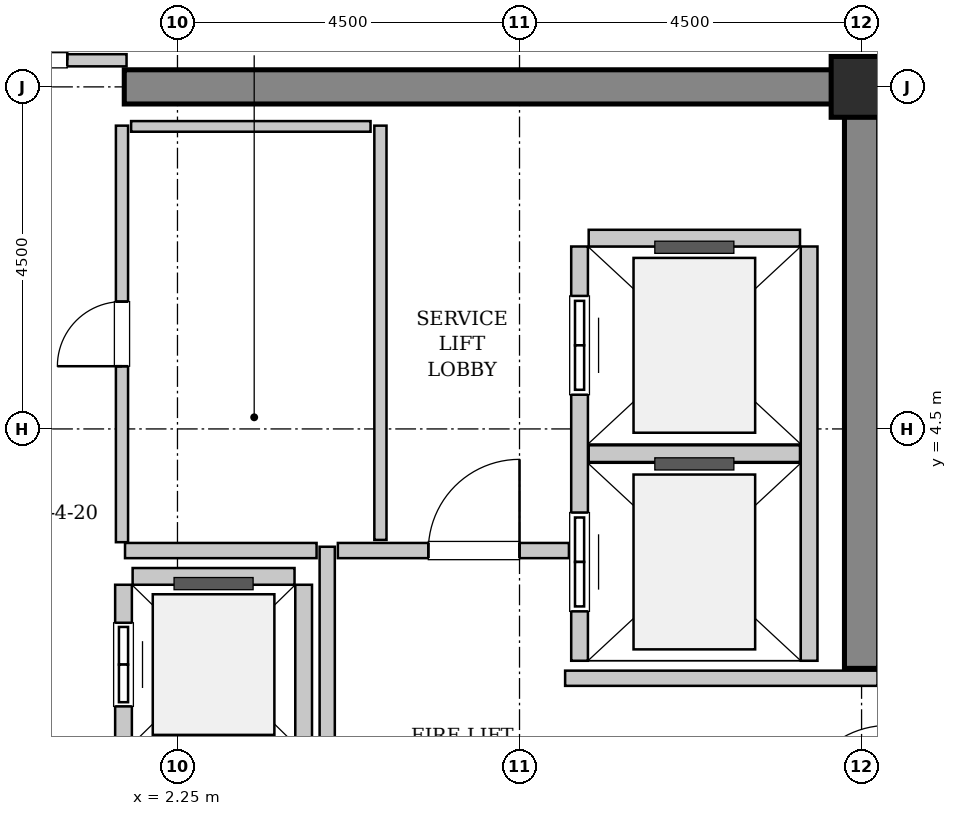
"""IFC4 building model, lengths in metres.
Left out: names, types, materials, properties, quantities, classifications, styles, units other than length and angle.
Written with IfcOpenShell. Run it as: python <this file> out.ifc"""

import sys

from ifc_helpers import new_model, si_unit, direction, frame, frame_2d, origin, origin_2d, place, context, subcontext, project, spatial, rectangle, hollow_rectangle, extrude, source, transform, mapped, element, fill, save


model = new_model("IFC4")
c1 = context("Model", 3, precision=1e-05, world=origin(), true_north=direction((0.0, 1.0)))
c2 = subcontext(c1, "Body", "Model", "MODEL_VIEW")
j1 = project(units=[si_unit("LENGTHUNIT", "METRE"), si_unit("PLANEANGLEUNIT", "RADIAN")], contexts=[c1])
p1 = place(None, origin())
s1 = spatial("IfcSite", under=j1, at=p1, CompositionType="ELEMENT")
p2 = place(p1, origin())
s2 = spatial("IfcBuilding", under=s1, at=p2, CompositionType="ELEMENT")
p3 = place(p2, frame((0.0, 0.0, 259.8)))
s3 = spatial("IfcBuildingStorey", under=s2, at=p3, CompositionType="ELEMENT", Elevation=259.8)
m1 = source(origin(), c2, "Body", "SweptSolid", [
    extrude(rectangle(XDim=9.925, YDim=0.45, at=frame_2d((4.962, 0.0))), origin(), (0.0, 0.0, 1.0), 4.8),
])
p4 = place(p3, frame((1.55, 9.0, 0.0), z_axis=(0.0, 0.0, 1.0), x_axis=(1.0, 0.0, 0.0)))
e1 = element("IfcWall", 1, at=p4, inside=s3, PredefinedType="SHEAR", context=c2, shape_type="MappedRepresentation", body=[
    mapped(m1, transform((0.0, 0.0, 0.0), x_axis=(1.0, 0.0, 0.0), y_axis=(0.0, 1.0, 0.0), z_axis=(0.0, 0.0, 1.0), scale=1.0)),
])
m2 = source(origin(), c2, "Body", "SweptSolid", [
    extrude(rectangle(XDim=7.425, YDim=0.45, at=frame_2d((3.712, 0.0))), origin(), (0.0, 0.0, 1.0), 4.8),
])
p5 = place(p3, frame((11.25, 1.35, 0.0), z_axis=(0.0, 0.0, 1.0), x_axis=(0.0, 1.0, 0.0)))
e2 = element("IfcWall", 2, at=p5, inside=s3, PredefinedType="SHEAR", context=c2, shape_type="MappedRepresentation", body=[
    mapped(m2, transform((0.0, 0.0, 0.0), x_axis=(1.0, 0.0, 0.0), y_axis=(0.0, 1.0, 0.0), z_axis=(0.0, 0.0, 1.0), scale=1.0)),
])
m3 = source(origin(), c2, "Body", "SweptSolid", [
    extrude(hollow_rectangle(XDim=0.8, YDim=0.8, WallThickness=0.04, InnerFilletRadius=0.04, OuterFilletRadius=0.08, at=origin_2d()), origin(), (0.0, 0.0, 1.0), 4.8),
])
p6 = place(p3, frame((11.25, 9.0, 0.0), z_axis=(0.0, 0.0, 1.0), x_axis=(1.0, 0.0, 0.0)))
e3 = element("IfcColumn", 3, at=p6, inside=s3, PredefinedType="COLUMN", context=c2, shape_type="MappedRepresentation", body=[
    mapped(m3, transform((0.0, 0.0, 0.0), x_axis=(1.0, 0.0, 0.0), y_axis=(0.0, 1.0, 0.0), z_axis=(0.0, 0.0, 1.0), scale=1.0)),
])
m4 = source(origin(), c2, "Body", "SweptSolid", [
    extrude(rectangle(XDim=5.45, YDim=0.22, at=frame_2d((2.725, 0.0))), origin(), (0.0, 0.0, 1.0), 4.535),
])
p7 = place(p3, frame((7.54, 6.9, 0.0), z_axis=(0.0, 0.0, 1.0), x_axis=(0.0, -1.0, 0.0)))
e4 = element("IfcWall", 4, at=p7, inside=s3, PredefinedType="SOLIDWALL", context=c2, shape_type="MappedRepresentation", body=[
    mapped(m4, transform((0.0, 0.0, 0.0), x_axis=(1.0, 0.0, 0.0), y_axis=(0.0, 1.0, 0.0), z_axis=(0.0, 0.0, 1.0), scale=1.0)),
])
p8 = place(p7, frame((3.5, 0.0, 0.0)))
e5 = element("IfcOpeningElement", 5, at=p8, cuts=e4, PredefinedType="OPENING", context=c2, shape_type="SweptSolid", body=[
    extrude(rectangle(XDim=1.3, YDim=2.3, at=frame_2d((0.65, 1.15))), frame((0.0, 0.12, 0.0), z_axis=(0.0, -1.0, 0.0), x_axis=(1.0, 0.0, 0.0)), (0.0, 0.0, 1.0), 0.24),
])
p9 = place(p7, frame((0.65, 0.0, 0.0)))
e6 = element("IfcOpeningElement", 6, at=p9, cuts=e4, PredefinedType="OPENING", context=c2, shape_type="SweptSolid", body=[
    extrude(rectangle(XDim=1.3, YDim=2.3, at=frame_2d((0.65, 1.15))), frame((0.0, 0.12, 0.0), z_axis=(0.0, -1.0, 0.0), x_axis=(1.0, 0.0, 0.0)), (0.0, 0.0, 1.0), 0.24),
])
p10 = place(p3, frame((10.56, 1.45, 0.0), z_axis=(0.0, 0.0, 1.0), x_axis=(0.0, 1.0, 0.0)))
e7 = element("IfcWall", 7, at=p10, inside=s3, PredefinedType="SOLIDWALL", context=c2, shape_type="MappedRepresentation", body=[
    mapped(m4, transform((0.0, 0.0, 0.0), x_axis=(1.0, 0.0, 0.0), y_axis=(0.0, 1.0, 0.0), z_axis=(0.0, 0.0, 1.0), scale=1.0)),
])
m5 = source(origin(), c2, "Body", "SweptSolid", [
    extrude(rectangle(XDim=2.78, YDim=0.22, at=frame_2d((1.39, 0.0))), origin(), (0.0, 0.0, 1.0), 4.535),
])
for number, where, z_axis, x_axis in (
    (8, (7.66, 4.175, 0.0), (0.0, 0.0, 1.0), (1.0, 0.0, 0.0)),
    (9, (10.44, 7.01, 0.0), (0.0, 0.0, 1.0), (-1.0, 0.0, 0.0)),
):
    element("IfcWall", number, at=place(p3, frame(where, z_axis=z_axis, x_axis=x_axis)), inside=s3, PredefinedType="SOLIDWALL", context=c2, shape_type="MappedRepresentation", body=[
        mapped(m5, transform((0.0, 0.0, 0.0), x_axis=(1.0, 0.0, 0.0), y_axis=(0.0, 1.0, 0.0), z_axis=(0.0, 0.0, 1.0), scale=1.0)),
    ])
m6 = source(origin(), c2, "Body", "SweptSolid", [
    extrude(rectangle(XDim=4.9, YDim=0.22, at=frame_2d((2.45, 0.0))), origin(), (0.0, 0.0, 1.0), 4.535),
])
p11 = place(p3, frame((1.54, 2.45, 0.0), z_axis=(0.0, 0.0, 1.0), x_axis=(0.0, -1.0, 0.0)))
e10 = element("IfcWall", 10, at=p11, inside=s3, PredefinedType="SOLIDWALL", context=c2, shape_type="MappedRepresentation", body=[
    mapped(m6, transform((0.0, 0.0, 0.0), x_axis=(1.0, 0.0, 0.0), y_axis=(0.0, 1.0, 0.0), z_axis=(0.0, 0.0, 1.0), scale=1.0)),
])
p12 = place(p11, frame((3.3, 0.0, 0.0)))
e11 = element("IfcOpeningElement", 11, at=p12, cuts=e10, PredefinedType="OPENING", context=c2, shape_type="SweptSolid", body=[
    extrude(rectangle(XDim=1.1, YDim=2.2, at=frame_2d((0.55, 1.1))), frame((0.0, 0.12, 0.0), z_axis=(0.0, -1.0, 0.0), x_axis=(1.0, 0.0, 0.0)), (0.0, 0.0, 1.0), 0.24),
])
p13 = place(p11, frame((0.5, 0.0, 0.0)))
e12 = element("IfcOpeningElement", 12, at=p13, cuts=e10, PredefinedType="OPENING", context=c2, shape_type="SweptSolid", body=[
    extrude(rectangle(XDim=1.1, YDim=2.2, at=frame_2d((0.55, 1.1))), frame((0.0, 0.12, 0.0), z_axis=(0.0, -1.0, 0.0), x_axis=(1.0, 0.0, 0.0)), (0.0, 0.0, 1.0), 0.24),
])
p14 = place(p3, frame((3.91, -2.45, 0.0), z_axis=(0.0, 0.0, 1.0), x_axis=(0.0, 1.0, 0.0)))
e13 = element("IfcWall", 13, at=p14, inside=s3, PredefinedType="SOLIDWALL", context=c2, shape_type="MappedRepresentation", body=[
    mapped(m6, transform((0.0, 0.0, 0.0), x_axis=(1.0, 0.0, 0.0), y_axis=(0.0, 1.0, 0.0), z_axis=(0.0, 0.0, 1.0), scale=1.0)),
])
m7 = source(origin(), c2, "Body", "SweptSolid", [
    extrude(rectangle(XDim=2.13, YDim=0.22, at=frame_2d((1.065, 0.0))), origin(), (0.0, 0.0, 1.0), 4.535),
])
p15 = place(p3, frame((3.79, 2.56, 0.0), z_axis=(0.0, 0.0, 1.0), x_axis=(-1.0, 0.0, 0.0)))
e14 = element("IfcWall", 14, at=p15, inside=s3, PredefinedType="SOLIDWALL", context=c2, shape_type="MappedRepresentation", body=[
    mapped(m7, transform((0.0, 0.0, 0.0), x_axis=(1.0, 0.0, 0.0), y_axis=(0.0, 1.0, 0.0), z_axis=(0.0, 0.0, 1.0), scale=1.0)),
])
m8 = source(origin(), c2, "Body", "SweptSolid", [
    extrude(rectangle(XDim=5.9, YDim=0.2, at=frame_2d((2.95, 0.0))), origin(), (0.0, 0.0, 1.0), 4.535),
])
p16 = place(p3, frame((4.22, -2.95, 0.0), z_axis=(0.0, 0.0, 1.0), x_axis=(0.0, 1.0, 0.0)))
e15 = element("IfcWall", 15, at=p16, inside=s3, PredefinedType="PARTITIONING", context=c2, shape_type="MappedRepresentation", body=[
    mapped(m8, transform((0.0, 0.0, 0.0), x_axis=(1.0, 0.0, 0.0), y_axis=(0.0, 1.0, 0.0), z_axis=(0.0, 0.0, 1.0), scale=1.0)),
])
m9 = source(origin(), c2, "Body", "SweptSolid", [
    extrude(rectangle(XDim=2.52, YDim=0.2, at=frame_2d((1.26, 0.0))), origin(), (0.0, 0.0, 1.0), 4.535),
])
p17 = place(p3, frame((1.56, 2.9, 0.0), z_axis=(0.0, 0.0, 1.0), x_axis=(1.0, 0.0, 0.0)))
e16 = element("IfcWall", 16, at=p17, inside=s3, PredefinedType="PARTITIONING", context=c2, shape_type="MappedRepresentation", body=[
    mapped(m9, transform((0.0, 0.0, 0.0), x_axis=(1.0, 0.0, 0.0), y_axis=(0.0, 1.0, 0.0), z_axis=(0.0, 0.0, 1.0), scale=1.0)),
])
m10 = source(origin(), c2, "Body", "SweptSolid", [
    extrude(rectangle(XDim=3.04, YDim=0.2, at=frame_2d((1.52, 0.0))), origin(), (0.0, 0.0, 1.0), 4.535),
])
p18 = place(p3, frame((4.36, 2.9, 0.0), z_axis=(0.0, 0.0, 1.0), x_axis=(1.0, 0.0, 0.0)))
e17 = element("IfcWall", 17, at=p18, inside=s3, PredefinedType="PARTITIONING", context=c2, shape_type="MappedRepresentation", body=[
    mapped(m10, transform((0.0, 0.0, 0.0), x_axis=(1.0, 0.0, 0.0), y_axis=(0.0, 1.0, 0.0), z_axis=(0.0, 0.0, 1.0), scale=1.0)),
])
p19 = place(p18, frame((1.19, 0.0, 0.0)))
e18 = element("IfcOpeningElement", 18, at=p19, cuts=e17, PredefinedType="OPENING", context=c2, shape_type="SweptSolid", body=[
    extrude(rectangle(XDim=1.2, YDim=2.15, at=frame_2d((0.6, 1.075))), frame((0.0, 0.11, 0.0), z_axis=(0.0, -1.0, 0.0), x_axis=(1.0, 0.0, 0.0)), (0.0, 0.0, 1.0), 0.22),
])
m11 = source(origin(), c2, "Body", "SweptSolid", [
    extrude(rectangle(XDim=4.11, YDim=0.2, at=frame_2d((2.055, 0.0))), origin(), (0.0, 0.0, 1.0), 4.535),
])
p20 = place(p3, frame((7.35, 1.22, 0.0), z_axis=(0.0, 0.0, 1.0), x_axis=(1.0, 0.0, 0.0)))
e19 = element("IfcWall", 19, at=p20, inside=s3, PredefinedType="PARTITIONING", context=c2, shape_type="MappedRepresentation", body=[
    mapped(m11, transform((0.0, 0.0, 0.0), x_axis=(1.0, 0.0, 0.0), y_axis=(0.0, 1.0, 0.0), z_axis=(0.0, 0.0, 1.0), scale=1.0)),
])
m12 = source(origin(), c2, "Body", "SweptSolid", [
    extrude(rectangle(XDim=3.16, YDim=0.16, at=frame_2d((1.58, 0.0))), origin(), (0.0, 0.0, 1.0), 3.625),
])
p21 = place(p3, frame((-1.58, 9.35, 0.0), z_axis=(0.0, 0.0, 1.0), x_axis=(1.0, 0.0, 0.0)))
e20 = element("IfcWall", 20, at=p21, inside=s3, PredefinedType="PARTITIONING", context=c2, shape_type="MappedRepresentation", body=[
    mapped(m12, transform((0.0, 0.0, 0.0), x_axis=(1.0, 0.0, 0.0), y_axis=(0.0, 1.0, 0.0), z_axis=(0.0, 0.0, 1.0), scale=1.0)),
])
p22 = place(p21, frame((0.78, 0.0, 0.0)))
e21 = element("IfcOpeningElement", 21, at=p22, cuts=e20, PredefinedType="OPENING", context=c2, shape_type="SweptSolid", body=[
    extrude(rectangle(XDim=1.6, YDim=2.3, at=frame_2d((0.8, 1.15))), frame((0.0, 0.09, 0.0), z_axis=(0.0, -1.0, 0.0), x_axis=(1.0, 0.0, 0.0)), (0.0, 0.0, 1.0), 0.18),
])
m13 = source(origin(), c2, "Body", "SweptSolid", [
    extrude(rectangle(XDim=5.45, YDim=0.16, at=frame_2d((2.725, 0.0))), origin(), (0.0, 0.0, 1.0), 4.535),
])
p23 = place(p3, frame((4.92, 3.04, 0.0), z_axis=(0.0, 0.0, 1.0), x_axis=(0.0, 1.0, 0.0)))
e22 = element("IfcWall", 22, at=p23, inside=s3, PredefinedType="PARTITIONING", context=c2, shape_type="MappedRepresentation", body=[
    mapped(m13, transform((0.0, 0.0, 0.0), x_axis=(1.0, 0.0, 0.0), y_axis=(0.0, 1.0, 0.0), z_axis=(0.0, 0.0, 1.0), scale=1.0)),
])
m14 = source(origin(), c2, "Body", "SweptSolid", [
    extrude(rectangle(XDim=5.48, YDim=0.16, at=frame_2d((2.74, 0.0))), origin(), (0.0, 0.0, 1.0), 4.535),
])
p24 = place(p3, frame((1.52, 3.01, 0.0), z_axis=(0.0, 0.0, 1.0), x_axis=(0.0, 1.0, 0.0)))
e23 = element("IfcWall", 23, at=p24, inside=s3, PredefinedType="PARTITIONING", context=c2, shape_type="MappedRepresentation", body=[
    mapped(m14, transform((0.0, 0.0, 0.0), x_axis=(1.0, 0.0, 0.0), y_axis=(0.0, 1.0, 0.0), z_axis=(0.0, 0.0, 1.0), scale=1.0)),
])
p25 = place(p24, frame((2.315, 0.0, 0.0)))
e24 = element("IfcOpeningElement", 24, at=p25, cuts=e23, PredefinedType="OPENING", context=c2, shape_type="SweptSolid", body=[
    extrude(rectangle(XDim=0.85, YDim=2.1, at=frame_2d((0.425, 1.05))), frame((0.0, 0.09, 0.0), z_axis=(0.0, -1.0, 0.0), x_axis=(1.0, 0.0, 0.0)), (0.0, 0.0, 1.0), 0.18),
])
m15 = source(origin(), c2, "Body", "SweptSolid", [
    extrude(rectangle(XDim=3.15, YDim=0.14, at=frame_2d((1.575, 0.0))), origin(), (0.0, 0.0, 1.0), 4.535),
])
p26 = place(p3, frame((1.64, 8.48, 0.0), z_axis=(0.0, 0.0, 1.0), x_axis=(1.0, 0.0, 0.0)))
e25 = element("IfcWall", 25, at=p26, inside=s3, PredefinedType="PARTITIONING", context=c2, shape_type="MappedRepresentation", body=[
    mapped(m15, transform((0.0, 0.0, 0.0), x_axis=(1.0, 0.0, 0.0), y_axis=(0.0, 1.0, 0.0), z_axis=(0.0, 0.0, 1.0), scale=1.0)),
])
m16 = source(origin(), c2, "Body", "SweptSolid", [
    extrude(rectangle(XDim=1.3, YDim=2.3, at=frame_2d((0.65, 1.15))), frame((0.0, 0.025, 0.0), z_axis=(0.0, -1.0, 0.0), x_axis=(1.0, 0.0, 0.0)), (0.0, 0.0, 1.0), 0.05),
])
p27 = place(p8, origin())
e26 = element("IfcDoor", 26, at=p27, inside=s3, OperationType="SLIDING_TO_RIGHT", PredefinedType="DOOR", context=c2, shape_type="MappedRepresentation", body=[
    mapped(m16, transform((0.0, 0.0, 0.0), x_axis=(1.0, 0.0, 0.0), y_axis=(0.0, 1.0, 0.0), z_axis=(0.0, 0.0, 1.0), scale=1.0)),
])
fill(e5, e26)
p28 = place(p9, origin())
e27 = element("IfcDoor", 27, at=p28, inside=s3, OperationType="SLIDING_TO_RIGHT", PredefinedType="DOOR", context=c2, shape_type="MappedRepresentation", body=[
    mapped(m16, transform((0.0, 0.0, 0.0), x_axis=(1.0, 0.0, 0.0), y_axis=(0.0, 1.0, 0.0), z_axis=(0.0, 0.0, 1.0), scale=1.0)),
])
fill(e6, e27)
m17 = source(origin(), c2, "Body", "SweptSolid", [
    extrude(rectangle(XDim=1.1, YDim=2.2, at=frame_2d((0.55, 1.1))), frame((0.0, 0.025, 0.0), z_axis=(0.0, -1.0, 0.0), x_axis=(1.0, 0.0, 0.0)), (0.0, 0.0, 1.0), 0.05),
])
p29 = place(p13, origin())
e28 = element("IfcDoor", 28, at=p29, inside=s3, OperationType="DOUBLE_DOOR_SLIDING", PredefinedType="DOOR", context=c2, shape_type="MappedRepresentation", body=[
    mapped(m17, transform((0.0, 0.0, 0.0), x_axis=(1.0, 0.0, 0.0), y_axis=(0.0, 1.0, 0.0), z_axis=(0.0, 0.0, 1.0), scale=1.0)),
])
fill(e12, e28)
m18 = source(origin(), c2, "Body", "SweptSolid", [
    extrude(rectangle(XDim=1.2, YDim=2.15, at=frame_2d((0.6, 1.075))), frame((0.0, 0.025, 0.0), z_axis=(0.0, -1.0, 0.0), x_axis=(1.0, 0.0, 0.0)), (0.0, 0.0, 1.0), 0.05),
])
p30 = place(p19, origin())
e29 = element("IfcDoor", 29, at=p30, inside=s3, OperationType="SINGLE_SWING_RIGHT", PredefinedType="DOOR", context=c2, shape_type="MappedRepresentation", body=[
    mapped(m18, transform((0.0, 0.0, 0.0), x_axis=(1.0, 0.0, 0.0), y_axis=(0.0, 1.0, 0.0), z_axis=(0.0, 0.0, 1.0), scale=1.0)),
])
fill(e18, e29)
m19 = source(origin(), c2, "Body", "SweptSolid", [
    extrude(rectangle(XDim=1.6, YDim=2.3, at=frame_2d((0.8, 1.15))), frame((0.0, 0.025, 0.0), z_axis=(0.0, -1.0, 0.0), x_axis=(1.0, 0.0, 0.0)), (0.0, 0.0, 1.0), 0.05),
])
p31 = place(p22, origin())
e30 = element("IfcDoor", 30, at=p31, inside=s3, OperationType="DOUBLE_DOOR_SINGLE_SWING", PredefinedType="DOOR", context=c2, shape_type="MappedRepresentation", body=[
    mapped(m19, transform((0.0, 0.0, 0.0), x_axis=(1.0, 0.0, 0.0), y_axis=(0.0, 1.0, 0.0), z_axis=(0.0, 0.0, 1.0), scale=1.0)),
])
fill(e21, e30)
m20 = source(origin(), c2, "Body", "SweptSolid", [
    extrude(rectangle(XDim=0.85, YDim=2.1, at=frame_2d((0.425, 1.05))), frame((0.0, 0.025, 0.0), z_axis=(0.0, -1.0, 0.0), x_axis=(1.0, 0.0, 0.0)), (0.0, 0.0, 1.0), 0.05),
])
p32 = place(p25, origin())
e31 = element("IfcDoor", 31, at=p32, inside=s3, OperationType="SINGLE_SWING_LEFT", PredefinedType="DOOR", context=c2, shape_type="MappedRepresentation", body=[
    mapped(m20, transform((0.0, 0.0, 0.0), x_axis=(1.0, 0.0, 0.0), y_axis=(0.0, 1.0, 0.0), z_axis=(0.0, 0.0, 1.0), scale=1.0)),
])
fill(e24, e31)
save(model, sys.argv[1])
